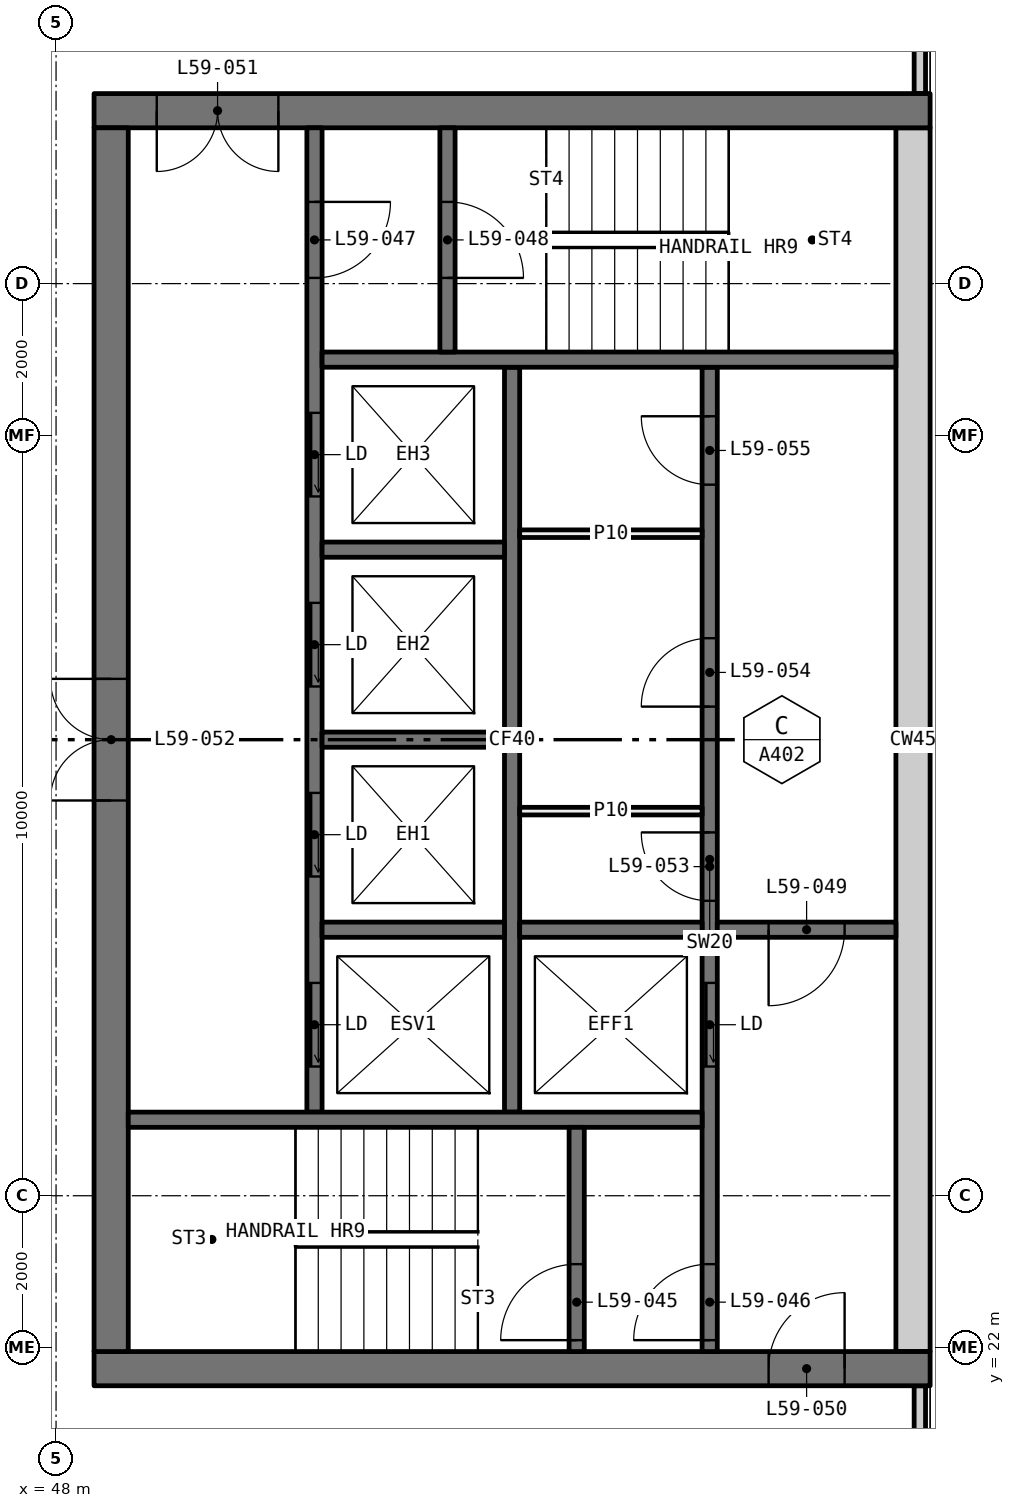
"""IFC4 building model, lengths in metres.
Left out: names, types, materials, properties, quantities, classifications, styles, units other than length and angle.
Written with IfcOpenShell. Run it as: python <this file> out.ifc"""

import sys

from ifc_helpers import new_model, si_unit, direction, frame, frame_2d, origin, place, context, subcontext, project, spatial, rectangle, extrude, element, fill, save


model = new_model("IFC4")
c1 = context("Model", 3, precision=1e-05, world=origin(), true_north=direction((0.0, 1.0)))
c2 = subcontext(c1, "Body", "Model", "MODEL_VIEW")
j1 = project(units=[si_unit("LENGTHUNIT", "METRE"), si_unit("PLANEANGLEUNIT", "RADIAN")], contexts=[c1])
p1 = place(None, origin())
s1 = spatial("IfcSite", under=j1, at=p1, CompositionType="ELEMENT")
p2 = place(p1, origin())
s2 = spatial("IfcBuilding", under=s1, at=p2, CompositionType="ELEMENT")
p3 = place(p2, frame((0.0, 0.0, 221.4)))
s3 = spatial("IfcBuildingStorey", under=s2, at=p3, CompositionType="ELEMENT", Elevation=221.4)
for number, where, z_axis, x_axis in (
    (1, (59.365, 18.71, 0.0), (0.0, 0.0, 1.0), (0.0, 1.0, 0.0)),
    (2, (59.365, 38.5, 0.0), (0.0, 0.0, 1.0), (0.0, 1.0, 0.0)),
):
    element("IfcWall", number, at=place(p3, frame(where, z_axis=z_axis, x_axis=x_axis)), inside=s3, PredefinedType="ELEMENTEDWALL", context=c2, shape_type="SweptSolid", body=[
        extrude(rectangle(XDim=2.79, YDim=0.15, at=frame_2d((1.395, 0.0))), origin(), (0.0, 0.0, 1.0), 3.05),
    ])
p4 = place(p3, frame((59.5, 21.725, 0.0), z_axis=(0.0, 0.0, 1.0), x_axis=(-1.0, 0.0, 0.0)))
e3 = element("IfcWall", 3, at=p4, inside=s3, PredefinedType="SHEAR", context=c2, shape_type="SweptSolid", body=[
    extrude(rectangle(XDim=11.0, YDim=0.45, at=frame_2d((5.5, 0.0))), origin(), (0.0, 0.0, 1.0), 3.05),
])
p5 = place(p4, frame((1.125, 0.0, 0.0)))
e4 = element("IfcOpeningElement", 4, at=p5, cuts=e3, PredefinedType="OPENING", context=c2, shape_type="SweptSolid", body=[
    extrude(rectangle(XDim=1.0, YDim=2.1, at=frame_2d((0.5, 1.05))), frame((0.0, 0.235, 0.0), z_axis=(0.0, -1.0, 0.0), x_axis=(1.0, 0.0, 0.0)), (0.0, 0.0, 1.0), 0.47),
])
p6 = place(p3, frame((59.5, 38.275, 0.0), z_axis=(0.0, 0.0, 1.0), x_axis=(-1.0, 0.0, 0.0)))
e5 = element("IfcWall", 5, at=p6, inside=s3, PredefinedType="SHEAR", context=c2, shape_type="SweptSolid", body=[
    extrude(rectangle(XDim=11.0, YDim=0.45, at=frame_2d((5.5, 0.0))), origin(), (0.0, 0.0, 1.0), 3.05),
])
p7 = place(p6, frame((8.575, 0.0, 0.0)))
e6 = element("IfcOpeningElement", 6, at=p7, cuts=e5, PredefinedType="OPENING", context=c2, shape_type="SweptSolid", body=[
    extrude(rectangle(XDim=1.6, YDim=2.1, at=frame_2d((0.8, 1.05))), frame((0.0, 0.235, 0.0), z_axis=(0.0, -1.0, 0.0), x_axis=(1.0, 0.0, 0.0)), (0.0, 0.0, 1.0), 0.47),
])
p8 = place(p3, frame((59.275, 21.95, 0.0), z_axis=(0.0, 0.0, 1.0), x_axis=(0.0, 1.0, 0.0)))
e7 = element("IfcWall", 7, at=p8, inside=s3, PredefinedType="SHEAR", context=c2, shape_type="SweptSolid", body=[
    extrude(rectangle(XDim=16.1, YDim=0.45, at=frame_2d((8.05, 0.0))), origin(), (0.0, 0.0, 1.0), 3.05),
])
p9 = place(p3, frame((48.725, 21.95, 0.0), z_axis=(0.0, 0.0, 1.0), x_axis=(0.0, 1.0, 0.0)))
e8 = element("IfcWall", 8, at=p9, inside=s3, PredefinedType="SHEAR", context=c2, shape_type="SweptSolid", body=[
    extrude(rectangle(XDim=16.1, YDim=0.45, at=frame_2d((8.05, 0.0))), origin(), (0.0, 0.0, 1.0), 3.05),
])
p10 = place(p9, frame((7.25, 0.0, 0.0)))
e9 = element("IfcOpeningElement", 9, at=p10, cuts=e8, PredefinedType="OPENING", context=c2, shape_type="SweptSolid", body=[
    extrude(rectangle(XDim=1.6, YDim=2.1, at=frame_2d((0.8, 1.05))), frame((0.0, 0.235, 0.0), z_axis=(0.0, -1.0, 0.0), x_axis=(1.0, 0.0, 0.0)), (0.0, 0.0, 1.0), 0.47),
])
p11 = place(p3, frame((56.6, 21.95, 0.0), z_axis=(0.0, 0.0, 1.0), x_axis=(0.0, 1.0, 0.0)))
e10 = element("IfcWall", 10, at=p11, inside=s3, PredefinedType="SOLIDWALL", context=c2, shape_type="SweptSolid", body=[
    extrude(rectangle(XDim=12.95, YDim=0.2, at=frame_2d((6.475, 0.0))), origin(), (0.0, 0.0, 1.0), 3.05),
])
p12 = place(p11, frame((3.75, 0.0, 0.0)))
e11 = element("IfcOpeningElement", 11, at=p12, cuts=e10, PredefinedType="OPENING", context=c2, shape_type="SweptSolid", body=[
    extrude(rectangle(XDim=1.1, YDim=2.1, at=frame_2d((0.55, 1.05))), frame((0.0, 0.11, 0.0), z_axis=(0.0, -1.0, 0.0), x_axis=(1.0, 0.0, 0.0)), (0.0, 0.0, 1.0), 0.22),
])
p13 = place(p11, frame((0.15, 0.0, 0.0)))
e12 = element("IfcOpeningElement", 12, at=p13, cuts=e10, PredefinedType="OPENING", context=c2, shape_type="SweptSolid", body=[
    extrude(rectangle(XDim=1.0, YDim=2.1, at=frame_2d((0.5, 1.05))), frame((0.0, 0.11, 0.0), z_axis=(0.0, -1.0, 0.0), x_axis=(1.0, 0.0, 0.0)), (0.0, 0.0, 1.0), 0.22),
])
p14 = place(p11, frame((5.93, 0.0, 0.0)))
e13 = element("IfcOpeningElement", 13, at=p14, cuts=e10, PredefinedType="OPENING", context=c2, shape_type="SweptSolid", body=[
    extrude(rectangle(XDim=0.9, YDim=2.1, at=frame_2d((0.45, 1.05))), frame((0.0, 0.11, 0.0), z_axis=(0.0, -1.0, 0.0), x_axis=(1.0, 0.0, 0.0)), (0.0, 0.0, 1.0), 0.22),
])
p15 = place(p11, frame((8.485, 0.0, 0.0)))
e14 = element("IfcOpeningElement", 14, at=p15, cuts=e10, PredefinedType="OPENING", context=c2, shape_type="SweptSolid", body=[
    extrude(rectangle(XDim=0.9, YDim=2.1, at=frame_2d((0.45, 1.05))), frame((0.0, 0.11, 0.0), z_axis=(0.0, -1.0, 0.0), x_axis=(1.0, 0.0, 0.0)), (0.0, 0.0, 1.0), 0.22),
])
p16 = place(p11, frame((11.405, 0.0, 0.0)))
e15 = element("IfcOpeningElement", 15, at=p16, cuts=e10, PredefinedType="OPENING", context=c2, shape_type="SweptSolid", body=[
    extrude(rectangle(XDim=0.9, YDim=2.1, at=frame_2d((0.45, 1.05))), frame((0.0, 0.11, 0.0), z_axis=(0.0, -1.0, 0.0), x_axis=(1.0, 0.0, 0.0)), (0.0, 0.0, 1.0), 0.22),
])
p17 = place(p3, frame((51.4, 25.1, 0.0), z_axis=(0.0, 0.0, 1.0), x_axis=(0.0, 1.0, 0.0)))
e16 = element("IfcWall", 16, at=p17, inside=s3, PredefinedType="SOLIDWALL", context=c2, shape_type="SweptSolid", body=[
    extrude(rectangle(XDim=12.95, YDim=0.2, at=frame_2d((6.475, 0.0))), origin(), (0.0, 0.0, 1.0), 3.05),
])
p18 = place(p17, frame((0.6, 0.0, 0.0)))
e17 = element("IfcOpeningElement", 17, at=p18, cuts=e16, PredefinedType="OPENING", context=c2, shape_type="SweptSolid", body=[
    extrude(rectangle(XDim=1.1, YDim=2.1, at=frame_2d((0.55, 1.05))), frame((0.0, 0.11, 0.0), z_axis=(0.0, -1.0, 0.0), x_axis=(1.0, 0.0, 0.0)), (0.0, 0.0, 1.0), 0.22),
])
p19 = place(p17, frame((3.1, 0.0, 0.0)))
e18 = element("IfcOpeningElement", 18, at=p19, cuts=e16, PredefinedType="OPENING", context=c2, shape_type="SweptSolid", body=[
    extrude(rectangle(XDim=1.1, YDim=2.1, at=frame_2d((0.55, 1.05))), frame((0.0, 0.11, 0.0), z_axis=(0.0, -1.0, 0.0), x_axis=(1.0, 0.0, 0.0)), (0.0, 0.0, 1.0), 0.22),
])
p20 = place(p17, frame((5.6, 0.0, 0.0)))
e19 = element("IfcOpeningElement", 19, at=p20, cuts=e16, PredefinedType="OPENING", context=c2, shape_type="SweptSolid", body=[
    extrude(rectangle(XDim=1.1, YDim=2.1, at=frame_2d((0.55, 1.05))), frame((0.0, 0.11, 0.0), z_axis=(0.0, -1.0, 0.0), x_axis=(1.0, 0.0, 0.0)), (0.0, 0.0, 1.0), 0.22),
])
p21 = place(p17, frame((8.1, 0.0, 0.0)))
e20 = element("IfcOpeningElement", 20, at=p21, cuts=e16, PredefinedType="OPENING", context=c2, shape_type="SweptSolid", body=[
    extrude(rectangle(XDim=1.1, YDim=2.1, at=frame_2d((0.55, 1.05))), frame((0.0, 0.11, 0.0), z_axis=(0.0, -1.0, 0.0), x_axis=(1.0, 0.0, 0.0)), (0.0, 0.0, 1.0), 0.22),
])
p22 = place(p17, frame((10.975, 0.0, 0.0)))
e21 = element("IfcOpeningElement", 21, at=p22, cuts=e16, PredefinedType="OPENING", context=c2, shape_type="SweptSolid", body=[
    extrude(rectangle(XDim=1.0, YDim=2.1, at=frame_2d((0.5, 1.05))), frame((0.0, 0.11, 0.0), z_axis=(0.0, -1.0, 0.0), x_axis=(1.0, 0.0, 0.0)), (0.0, 0.0, 1.0), 0.22),
])
p23 = place(p3, frame((54.0, 25.1, 0.0), z_axis=(0.0, 0.0, 1.0), x_axis=(0.0, 1.0, 0.0)))
e22 = element("IfcWall", 22, at=p23, inside=s3, PredefinedType="SOLIDWALL", context=c2, shape_type="SweptSolid", body=[
    extrude(rectangle(XDim=9.8, YDim=0.2, at=frame_2d((4.9, 0.0))), origin(), (0.0, 0.0, 1.0), 3.05),
])
for number, where, z_axis, x_axis in (
    (23, (56.5, 25.0, 0.0), (0.0, 0.0, 1.0), (-1.0, 0.0, 0.0)),
    (24, (59.05, 35.0, 0.0), (0.0, 0.0, 1.0), (-1.0, 0.0, 0.0)),
):
    element("IfcWall", number, at=place(p3, frame(where, z_axis=z_axis, x_axis=x_axis)), inside=s3, PredefinedType="SOLIDWALL", context=c2, shape_type="SweptSolid", body=[
        extrude(rectangle(XDim=7.55, YDim=0.2, at=frame_2d((3.775, 0.0))), origin(), (0.0, 0.0, 1.0), 3.05),
    ])
p24 = place(p3, frame((59.05, 27.5, 0.0), z_axis=(0.0, 0.0, 1.0), x_axis=(-1.0, 0.0, 0.0)))
e25 = element("IfcWall", 25, at=p24, inside=s3, PredefinedType="SOLIDWALL", context=c2, shape_type="SweptSolid", body=[
    extrude(rectangle(XDim=2.35, YDim=0.2, at=frame_2d((1.175, 0.0))), origin(), (0.0, 0.0, 1.0), 3.05),
])
p25 = place(p24, frame((0.675, 0.0, 0.0)))
e26 = element("IfcOpeningElement", 26, at=p25, cuts=e25, PredefinedType="OPENING", context=c2, shape_type="SweptSolid", body=[
    extrude(rectangle(XDim=1.0, YDim=2.1, at=frame_2d((0.5, 1.05))), frame((0.0, 0.11, 0.0), z_axis=(0.0, -1.0, 0.0), x_axis=(1.0, 0.0, 0.0)), (0.0, 0.0, 1.0), 0.22),
])
p26 = place(p3, frame((54.85, 21.95, 0.0), z_axis=(0.0, 0.0, 1.0), x_axis=(0.0, 1.0, 0.0)))
e27 = element("IfcWall", 27, at=p26, inside=s3, PredefinedType="SOLIDWALL", context=c2, shape_type="SweptSolid", body=[
    extrude(rectangle(XDim=2.95, YDim=0.2, at=frame_2d((1.475, 0.0))), origin(), (0.0, 0.0, 1.0), 3.05),
])
p27 = place(p26, frame((0.15, 0.0, 0.0)))
e28 = element("IfcOpeningElement", 28, at=p27, cuts=e27, PredefinedType="OPENING", context=c2, shape_type="SweptSolid", body=[
    extrude(rectangle(XDim=1.0, YDim=2.1, at=frame_2d((0.5, 1.05))), frame((0.0, 0.11, 0.0), z_axis=(0.0, -1.0, 0.0), x_axis=(1.0, 0.0, 0.0)), (0.0, 0.0, 1.0), 0.22),
])
p28 = place(p3, frame((53.15, 35.1, 0.0), z_axis=(0.0, 0.0, 1.0), x_axis=(0.0, 1.0, 0.0)))
e29 = element("IfcWall", 29, at=p28, inside=s3, PredefinedType="SOLIDWALL", context=c2, shape_type="SweptSolid", body=[
    extrude(rectangle(XDim=2.95, YDim=0.2, at=frame_2d((1.475, 0.0))), origin(), (0.0, 0.0, 1.0), 3.05),
])
p29 = place(p28, frame((0.975, 0.0, 0.0)))
e30 = element("IfcOpeningElement", 30, at=p29, cuts=e29, PredefinedType="OPENING", context=c2, shape_type="SweptSolid", body=[
    extrude(rectangle(XDim=1.0, YDim=2.1, at=frame_2d((0.5, 1.05))), frame((0.0, 0.11, 0.0), z_axis=(0.0, -1.0, 0.0), x_axis=(1.0, 0.0, 0.0)), (0.0, 0.0, 1.0), 0.22),
])
for number, where, z_axis, x_axis in (
    (31, (56.5, 27.5, 0.0), (0.0, 0.0, 1.0), (-1.0, 0.0, 0.0)),
    (32, (53.9, 27.5, 0.0), (0.0, 0.0, 1.0), (-1.0, 0.0, 0.0)),
    (33, (53.9, 30.0, 0.0), (0.0, 0.0, 1.0), (-1.0, 0.0, 0.0)),
    (34, (53.9, 32.5, 0.0), (0.0, 0.0, 1.0), (-1.0, 0.0, 0.0)),
):
    element("IfcWall", number, at=place(p3, frame(where, z_axis=z_axis, x_axis=x_axis)), inside=s3, PredefinedType="SOLIDWALL", context=c2, shape_type="SweptSolid", body=[
        extrude(rectangle(XDim=2.4, YDim=0.2, at=frame_2d((1.2, 0.0))), origin(), (0.0, 0.0, 1.0), 3.05),
    ])
for number, where, z_axis, x_axis in (
    (35, (56.5, 29.06, 0.0), (0.0, 0.0, 1.0), (-1.0, 0.0, 0.0)),
    (36, (56.5, 32.71, 0.0), (0.0, 0.0, 1.0), (-1.0, 0.0, 0.0)),
):
    element("IfcWall", number, at=place(p3, frame(where, z_axis=z_axis, x_axis=x_axis)), inside=s3, PredefinedType="PARTITIONING", context=c2, shape_type="SweptSolid", body=[
        extrude(rectangle(XDim=2.4, YDim=0.1, at=frame_2d((1.2, 0.0))), origin(), (0.0, 0.0, 1.0), 3.05),
    ])
p30 = place(p18, origin())
e37 = element("IfcDoor", 37, at=p30, inside=s3, OperationType="SLIDING_TO_LEFT", PredefinedType="DOOR", context=c2, shape_type="SweptSolid", body=[
    extrude(rectangle(XDim=1.1, YDim=2.1, at=frame_2d((0.55, 1.05))), frame((0.0, 0.025, 0.0), z_axis=(0.0, -1.0, 0.0), x_axis=(1.0, 0.0, 0.0)), (0.0, 0.0, 1.0), 0.05),
])
fill(e17, e37)
p31 = place(p19, origin())
e38 = element("IfcDoor", 38, at=p31, inside=s3, OperationType="SLIDING_TO_LEFT", PredefinedType="DOOR", context=c2, shape_type="SweptSolid", body=[
    extrude(rectangle(XDim=1.1, YDim=2.1, at=frame_2d((0.55, 1.05))), frame((0.0, 0.025, 0.0), z_axis=(0.0, -1.0, 0.0), x_axis=(1.0, 0.0, 0.0)), (0.0, 0.0, 1.0), 0.05),
])
fill(e18, e38)
p32 = place(p20, origin())
e39 = element("IfcDoor", 39, at=p32, inside=s3, OperationType="SLIDING_TO_LEFT", PredefinedType="DOOR", context=c2, shape_type="SweptSolid", body=[
    extrude(rectangle(XDim=1.1, YDim=2.1, at=frame_2d((0.55, 1.05))), frame((0.0, 0.025, 0.0), z_axis=(0.0, -1.0, 0.0), x_axis=(1.0, 0.0, 0.0)), (0.0, 0.0, 1.0), 0.05),
])
fill(e19, e39)
p33 = place(p21, origin())
e40 = element("IfcDoor", 40, at=p33, inside=s3, OperationType="SLIDING_TO_LEFT", PredefinedType="DOOR", context=c2, shape_type="SweptSolid", body=[
    extrude(rectangle(XDim=1.1, YDim=2.1, at=frame_2d((0.55, 1.05))), frame((0.0, 0.025, 0.0), z_axis=(0.0, -1.0, 0.0), x_axis=(1.0, 0.0, 0.0)), (0.0, 0.0, 1.0), 0.05),
])
fill(e20, e40)
p34 = place(p12, origin())
e41 = element("IfcDoor", 41, at=p34, inside=s3, OperationType="SLIDING_TO_LEFT", PredefinedType="DOOR", context=c2, shape_type="SweptSolid", body=[
    extrude(rectangle(XDim=1.1, YDim=2.1, at=frame_2d((0.55, 1.05))), frame((0.0, 0.025, 0.0), z_axis=(0.0, -1.0, 0.0), x_axis=(1.0, 0.0, 0.0)), (0.0, 0.0, 1.0), 0.05),
])
fill(e11, e41)
p35 = place(p27, origin())
e42 = element("IfcDoor", 42, at=p35, inside=s3, OperationType="SINGLE_SWING_RIGHT", PredefinedType="DOOR", context=c2, shape_type="SweptSolid", body=[
    extrude(rectangle(XDim=1.0, YDim=2.1, at=frame_2d((0.5, 1.05))), frame((0.0, 0.025, 0.0), z_axis=(0.0, -1.0, 0.0), x_axis=(1.0, 0.0, 0.0)), (0.0, 0.0, 1.0), 0.05),
])
fill(e28, e42)
p36 = place(p13, origin())
e43 = element("IfcDoor", 43, at=p36, inside=s3, OperationType="SINGLE_SWING_RIGHT", PredefinedType="DOOR", context=c2, shape_type="SweptSolid", body=[
    extrude(rectangle(XDim=1.0, YDim=2.1, at=frame_2d((0.5, 1.05))), frame((0.0, 0.025, 0.0), z_axis=(0.0, -1.0, 0.0), x_axis=(1.0, 0.0, 0.0)), (0.0, 0.0, 1.0), 0.05),
])
fill(e12, e43)
p37 = place(p22, frame((1.0, 0.0, 0.0), x_axis=(-1.0, 0.0, 0.0)))
e44 = element("IfcDoor", 44, at=p37, inside=s3, OperationType="SINGLE_SWING_RIGHT", PredefinedType="DOOR", context=c2, shape_type="SweptSolid", body=[
    extrude(rectangle(XDim=1.0, YDim=2.1, at=frame_2d((0.5, 1.05))), frame((0.0, 0.025, 0.0), z_axis=(0.0, -1.0, 0.0), x_axis=(1.0, 0.0, 0.0)), (0.0, 0.0, 1.0), 0.05),
])
fill(e21, e44)
p38 = place(p29, frame((1.0, 0.0, 0.0), x_axis=(-1.0, 0.0, 0.0)))
e45 = element("IfcDoor", 45, at=p38, inside=s3, OperationType="SINGLE_SWING_LEFT", PredefinedType="DOOR", context=c2, shape_type="SweptSolid", body=[
    extrude(rectangle(XDim=1.0, YDim=2.1, at=frame_2d((0.5, 1.05))), frame((0.0, 0.025, 0.0), z_axis=(0.0, -1.0, 0.0), x_axis=(1.0, 0.0, 0.0)), (0.0, 0.0, 1.0), 0.05),
])
fill(e30, e45)
p39 = place(p25, origin())
e46 = element("IfcDoor", 46, at=p39, inside=s3, OperationType="SINGLE_SWING_LEFT", PredefinedType="DOOR", context=c2, shape_type="SweptSolid", body=[
    extrude(rectangle(XDim=1.0, YDim=2.1, at=frame_2d((0.5, 1.05))), frame((0.0, 0.025, 0.0), z_axis=(0.0, -1.0, 0.0), x_axis=(1.0, 0.0, 0.0)), (0.0, 0.0, 1.0), 0.05),
])
fill(e26, e46)
p40 = place(p5, frame((1.0, 0.0, 0.0), x_axis=(-1.0, 0.0, 0.0)))
e47 = element("IfcDoor", 47, at=p40, inside=s3, OperationType="SINGLE_SWING_LEFT", PredefinedType="DOOR", context=c2, shape_type="SweptSolid", body=[
    extrude(rectangle(XDim=1.0, YDim=2.1, at=frame_2d((0.5, 1.05))), frame((0.0, 0.025, 0.0), z_axis=(0.0, -1.0, 0.0), x_axis=(1.0, 0.0, 0.0)), (0.0, 0.0, 1.0), 0.05),
])
fill(e4, e47)
p41 = place(p7, origin())
e48 = element("IfcDoor", 48, at=p41, inside=s3, OperationType="DOUBLE_DOOR_SINGLE_SWING", PredefinedType="DOOR", context=c2, shape_type="SweptSolid", body=[
    extrude(rectangle(XDim=1.6, YDim=2.1, at=frame_2d((0.8, 1.05))), frame((0.0, 0.025, 0.0), z_axis=(0.0, -1.0, 0.0), x_axis=(1.0, 0.0, 0.0)), (0.0, 0.0, 1.0), 0.05),
])
fill(e6, e48)
p42 = place(p10, origin())
e49 = element("IfcDoor", 49, at=p42, inside=s3, OperationType="DOUBLE_DOOR_SINGLE_SWING", PredefinedType="DOOR", context=c2, shape_type="SweptSolid", body=[
    extrude(rectangle(XDim=1.6, YDim=2.1, at=frame_2d((0.8, 1.05))), frame((0.0, 0.025, 0.0), z_axis=(0.0, -1.0, 0.0), x_axis=(1.0, 0.0, 0.0)), (0.0, 0.0, 1.0), 0.05),
])
fill(e9, e49)
p43 = place(p14, origin())
e50 = element("IfcDoor", 50, at=p43, inside=s3, OperationType="SINGLE_SWING_LEFT", PredefinedType="DOOR", context=c2, shape_type="SweptSolid", body=[
    extrude(rectangle(XDim=0.9, YDim=2.1, at=frame_2d((0.45, 1.05))), frame((0.0, 0.025, 0.0), z_axis=(0.0, -1.0, 0.0), x_axis=(1.0, 0.0, 0.0)), (0.0, 0.0, 1.0), 0.05),
])
fill(e13, e50)
p44 = place(p15, origin())
e51 = element("IfcDoor", 51, at=p44, inside=s3, OperationType="SINGLE_SWING_RIGHT", PredefinedType="DOOR", context=c2, shape_type="SweptSolid", body=[
    extrude(rectangle(XDim=0.9, YDim=2.1, at=frame_2d((0.45, 1.05))), frame((0.0, 0.025, 0.0), z_axis=(0.0, -1.0, 0.0), x_axis=(1.0, 0.0, 0.0)), (0.0, 0.0, 1.0), 0.05),
])
fill(e14, e51)
p45 = place(p16, origin())
e52 = element("IfcDoor", 52, at=p45, inside=s3, OperationType="SINGLE_SWING_LEFT", PredefinedType="DOOR", context=c2, shape_type="SweptSolid", body=[
    extrude(rectangle(XDim=0.9, YDim=2.1, at=frame_2d((0.45, 1.05))), frame((0.0, 0.025, 0.0), z_axis=(0.0, -1.0, 0.0), x_axis=(1.0, 0.0, 0.0)), (0.0, 0.0, 1.0), 0.05),
])
fill(e15, e52)
save(model, sys.argv[1])
